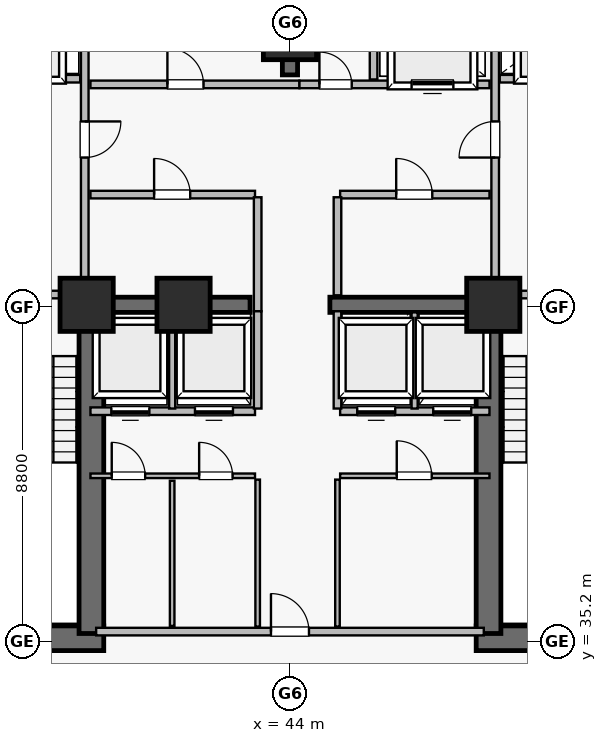
"""IFC4 building model, lengths in metres.
Left out: names, types, materials, properties, quantities, classifications, styles, units other than length and angle.
Written with IfcOpenShell. Run it as: python <this file> out.ifc"""

import sys

from ifc_helpers import new_model, si_unit, direction, frame, frame_2d, origin, origin_2d, place, context, subcontext, project, spatial, rectangle, extrude, element, fill, save


model = new_model("IFC4")
c1 = context("Model", 3, precision=1e-05, world=origin(), true_north=direction((0.0, 1.0)))
c2 = subcontext(c1, "Body", "Model", "MODEL_VIEW")
j1 = project(units=[si_unit("LENGTHUNIT", "METRE"), si_unit("PLANEANGLEUNIT", "RADIAN")], contexts=[c1])
p1 = place(None, origin())
s1 = spatial("IfcSite", under=j1, at=p1, CompositionType="ELEMENT")
p2 = place(p1, origin())
s2 = spatial("IfcBuilding", under=s1, at=p2, CompositionType="ELEMENT")
p3 = place(p2, frame((0.0, 0.0, -11.7)))
s3 = spatial("IfcBuildingStorey", under=s2, at=p3, CompositionType="ELEMENT", Elevation=-11.7)
for number, where, z_axis, x_axis in (
    (1, (34.95, 35.275, 0.0), (0.0, 0.0, 1.0), (1.0, 0.0, 0.0)),
    (2, (48.9, 35.275, 0.0), (0.0, 0.0, 1.0), (1.0, 0.0, 0.0)),
):
    element("IfcWall", number, at=place(p3, frame(where, z_axis=z_axis, x_axis=x_axis)), inside=s3, PredefinedType="SHEAR", context=c2, shape_type="SweptSolid", body=[
        extrude(rectangle(XDim=4.15, YDim=0.65, at=frame_2d((2.075, 0.0))), origin(), (0.0, 0.0, 1.0), 3.58),
    ])
for number, where, z_axis, x_axis in (
    (3, (38.775, 35.4, 0.0), (0.0, 0.0, 1.0), (0.0, 1.0, 0.0)),
    (4, (49.225, 35.4, 0.0), (0.0, 0.0, 1.0), (0.0, 1.0, 0.0)),
):
    element("IfcWall", number, at=place(p3, frame(where, z_axis=z_axis, x_axis=x_axis)), inside=s3, PredefinedType="SHEAR", context=c2, shape_type="SweptSolid", body=[
        extrude(rectangle(XDim=8.95, YDim=0.65, at=frame_2d((4.475, 0.0))), origin(), (0.0, 0.0, 1.0), 3.58),
    ])
p4 = place(p3, frame((44.0, 50.1, 0.0), z_axis=(0.0, 0.0, 1.0), x_axis=(0.0, 1.0, 0.0)))
e5 = element("IfcWall", 5, at=p4, inside=s3, PredefinedType="SHEAR", context=c2, shape_type="SweptSolid", body=[
    extrude(rectangle(XDim=2.1, YDim=0.4, at=frame_2d((1.05, 0.0))), origin(), (0.0, 0.0, 1.0), 3.58),
])
for number, where, z_axis, x_axis in (
    (6, (38.75, 44.05, 0.0), (0.0, 0.0, 1.0), (1.0, 0.0, 0.0)),
    (7, (45.05, 44.05, 0.0), (0.0, 0.0, 1.0), (1.0, 0.0, 0.0)),
):
    element("IfcWall", number, at=place(p3, frame(where, z_axis=z_axis, x_axis=x_axis)), inside=s3, PredefinedType="SHEAR", context=c2, shape_type="SweptSolid", body=[
        extrude(rectangle(XDim=4.2, YDim=0.4, at=frame_2d((2.1, 0.0))), origin(), (0.0, 0.0, 1.0), 3.58),
    ])
for number, where, z_axis, x_axis in (
    (8, (38.65, 44.05, 0.0), (0.0, 0.0, 1.0), (1.0, 0.0, 0.0)),
    (9, (49.35, 44.05, 0.0), (0.0, 0.0, 1.0), (1.0, 0.0, 0.0)),
    (10, (44.0, 51.2, 0.0), (0.0, 0.0, 1.0), (1.0, 0.0, 0.0)),
    (11, (41.2, 44.05, 0.0), (0.0, 0.0, 1.0), (1.0, 0.0, 0.0)),
):
    element("IfcColumn", number, at=place(p3, frame(where, z_axis=z_axis, x_axis=x_axis)), inside=s3, PredefinedType="COLUMN", context=c2, shape_type="SweptSolid", body=[
        extrude(rectangle(XDim=1.4, YDim=1.4, at=origin_2d()), origin(), (0.0, 0.0, 1.0), 3.9),
    ])
p5 = place(p3, frame((38.9, 35.45, 0.0), z_axis=(0.0, 0.0, 1.0), x_axis=(1.0, 0.0, 0.0)))
e12 = element("IfcWall", 12, at=p5, inside=s3, PredefinedType="SOLIDWALL", context=c2, shape_type="SweptSolid", body=[
    extrude(rectangle(XDim=10.2, YDim=0.2, at=frame_2d((5.1, 0.0))), origin(), (0.0, 0.0, 1.0), 3.58),
])
p6 = place(p5, frame((4.6, 0.0, 0.0)))
e13 = element("IfcOpeningElement", 13, at=p6, cuts=e12, PredefinedType="OPENING", context=c2, shape_type="SweptSolid", body=[
    extrude(rectangle(XDim=1.0, YDim=2.15, at=frame_2d((0.5, 1.075))), frame((0.0, 0.11, 0.0), z_axis=(0.0, -1.0, 0.0), x_axis=(1.0, 0.0, 0.0)), (0.0, 0.0, 1.0), 0.22),
])
p7 = place(p3, frame((38.6, 44.5, 0.0), z_axis=(0.0, 0.0, 1.0), x_axis=(0.0, 1.0, 0.0)))
e14 = element("IfcWall", 14, at=p7, inside=s3, PredefinedType="SOLIDWALL", context=c2, shape_type="SweptSolid", body=[
    extrude(rectangle(XDim=7.92, YDim=0.2, at=frame_2d((3.96, 0.0))), origin(), (0.0, 0.0, 1.0), 3.58),
])
p8 = place(p7, frame((3.425, 0.0, 0.0)))
e15 = element("IfcOpeningElement", 15, at=p8, cuts=e14, PredefinedType="OPENING", context=c2, shape_type="SweptSolid", body=[
    extrude(rectangle(XDim=0.95, YDim=2.15, at=frame_2d((0.475, 1.075))), frame((0.0, 0.11, 0.0), z_axis=(0.0, -1.0, 0.0), x_axis=(1.0, 0.0, 0.0)), (0.0, 0.0, 1.0), 0.22),
])
p9 = place(p3, frame((49.4, 44.5, 0.0), z_axis=(0.0, 0.0, 1.0), x_axis=(0.0, 1.0, 0.0)))
e16 = element("IfcWall", 16, at=p9, inside=s3, PredefinedType="SOLIDWALL", context=c2, shape_type="SweptSolid", body=[
    extrude(rectangle(XDim=7.92, YDim=0.2, at=frame_2d((3.96, 0.0))), origin(), (0.0, 0.0, 1.0), 3.58),
])
p10 = place(p9, frame((3.425, 0.0, 0.0)))
e17 = element("IfcOpeningElement", 17, at=p10, cuts=e16, PredefinedType="OPENING", context=c2, shape_type="SweptSolid", body=[
    extrude(rectangle(XDim=0.95, YDim=2.15, at=frame_2d((0.475, 1.075))), frame((0.0, 0.11, 0.0), z_axis=(0.0, -1.0, 0.0), x_axis=(1.0, 0.0, 0.0)), (0.0, 0.0, 1.0), 0.22),
])
p11 = place(p3, frame((38.75, 49.85, 0.0), z_axis=(0.0, 0.0, 1.0), x_axis=(1.0, 0.0, 0.0)))
e18 = element("IfcWall", 18, at=p11, inside=s3, PredefinedType="SOLIDWALL", context=c2, shape_type="SweptSolid", body=[
    extrude(rectangle(XDim=5.5, YDim=0.2, at=frame_2d((2.75, 0.0))), origin(), (0.0, 0.0, 1.0), 3.58),
])
p12 = place(p11, frame((2.025, 0.0, 0.0)))
e19 = element("IfcOpeningElement", 19, at=p12, cuts=e18, PredefinedType="OPENING", context=c2, shape_type="SweptSolid", body=[
    extrude(rectangle(XDim=0.95, YDim=2.15, at=frame_2d((0.475, 1.075))), frame((0.0, 0.11, 0.0), z_axis=(0.0, -1.0, 0.0), x_axis=(1.0, 0.0, 0.0)), (0.0, 0.0, 1.0), 0.22),
])
p13 = place(p3, frame((44.25, 49.85, 0.0), z_axis=(0.0, 0.0, 1.0), x_axis=(1.0, 0.0, 0.0)))
e20 = element("IfcWall", 20, at=p13, inside=s3, PredefinedType="SOLIDWALL", context=c2, shape_type="SweptSolid", body=[
    extrude(rectangle(XDim=5.0, YDim=0.2, at=frame_2d((2.5, 0.0))), origin(), (0.0, 0.0, 1.0), 2.918),
])
p14 = place(p13, frame((0.525, 0.0, 0.0)))
e21 = element("IfcOpeningElement", 21, at=p14, cuts=e20, PredefinedType="OPENING", context=c2, shape_type="SweptSolid", body=[
    extrude(rectangle(XDim=0.85, YDim=2.1, at=frame_2d((0.425, 1.05))), frame((0.0, 0.11, 0.0), z_axis=(0.0, -1.0, 0.0), x_axis=(1.0, 0.0, 0.0)), (0.0, 0.0, 1.0), 0.22),
])
p15 = place(p13, frame((2.95, 0.0, 0.0)))
e22 = element("IfcOpeningElement", 22, at=p15, cuts=e20, PredefinedType="OPENING", context=c2, shape_type="SweptSolid", body=[
    extrude(rectangle(XDim=1.1, YDim=2.15, at=frame_2d((0.55, 1.075))), frame((0.0, 0.11, 0.0), z_axis=(0.0, -1.0, 0.0), x_axis=(1.0, 0.0, 0.0)), (0.0, 0.0, 1.0), 0.22),
])
p16 = place(p3, frame((38.75, 46.95, 0.0), z_axis=(0.0, 0.0, 1.0), x_axis=(1.0, 0.0, 0.0)))
e23 = element("IfcWall", 23, at=p16, inside=s3, PredefinedType="SOLIDWALL", context=c2, shape_type="SweptSolid", body=[
    extrude(rectangle(XDim=4.33, YDim=0.2, at=frame_2d((2.165, 0.0))), origin(), (0.0, 0.0, 1.0), 3.58),
])
p17 = place(p16, frame((1.675, 0.0, 0.0)))
e24 = element("IfcOpeningElement", 24, at=p17, cuts=e23, PredefinedType="OPENING", context=c2, shape_type="SweptSolid", body=[
    extrude(rectangle(XDim=0.95, YDim=2.15, at=frame_2d((0.475, 1.075))), frame((0.0, 0.11, 0.0), z_axis=(0.0, -1.0, 0.0), x_axis=(1.0, 0.0, 0.0)), (0.0, 0.0, 1.0), 0.22),
])
p18 = place(p3, frame((38.75, 41.25, 0.0), z_axis=(0.0, 0.0, 1.0), x_axis=(1.0, 0.0, 0.0)))
e25 = element("IfcWall", 25, at=p18, inside=s3, PredefinedType="SOLIDWALL", context=c2, shape_type="SweptSolid", body=[
    extrude(rectangle(XDim=4.33, YDim=0.2, at=frame_2d((2.165, 0.0))), origin(), (0.0, 0.0, 1.0), 3.58),
])
p19 = place(p18, frame((0.55, 0.0, 0.0)))
e26 = element("IfcOpeningElement", 26, at=p19, cuts=e25, PredefinedType="OPENING", context=c2, shape_type="SweptSolid", body=[
    extrude(rectangle(XDim=1.0, YDim=2.15, at=frame_2d((0.5, 1.075))), frame((0.0, 0.11, 0.0), z_axis=(0.0, -1.0, 0.0), x_axis=(1.0, 0.0, 0.0)), (0.0, 0.0, 1.0), 0.22),
])
p20 = place(p18, frame((2.75, 0.0, 0.0)))
e27 = element("IfcOpeningElement", 27, at=p20, cuts=e25, PredefinedType="OPENING", context=c2, shape_type="SweptSolid", body=[
    extrude(rectangle(XDim=1.0, YDim=2.15, at=frame_2d((0.5, 1.075))), frame((0.0, 0.11, 0.0), z_axis=(0.0, -1.0, 0.0), x_axis=(1.0, 0.0, 0.0)), (0.0, 0.0, 1.0), 0.22),
])
p21 = place(p3, frame((38.75, 39.55, 0.0), z_axis=(0.0, 0.0, 1.0), x_axis=(1.0, 0.0, 0.0)))
e28 = element("IfcWall", 28, at=p21, inside=s3, PredefinedType="PARTITIONING", context=c2, shape_type="SweptSolid", body=[
    extrude(rectangle(XDim=4.33, YDim=0.12, at=frame_2d((2.165, 0.0))), origin(), (0.0, 0.0, 1.0), 3.58),
])
p22 = place(p21, frame((0.56, 0.0, 0.0)))
e29 = element("IfcOpeningElement", 29, at=p22, cuts=e28, PredefinedType="OPENING", context=c2, shape_type="SweptSolid", body=[
    extrude(rectangle(XDim=0.88, YDim=2.1, at=frame_2d((0.44, 1.05))), frame((0.0, 0.07, 0.0), z_axis=(0.0, -1.0, 0.0), x_axis=(1.0, 0.0, 0.0)), (0.0, 0.0, 1.0), 0.14),
])
p23 = place(p21, frame((2.86, 0.0, 0.0)))
e30 = element("IfcOpeningElement", 30, at=p23, cuts=e28, PredefinedType="OPENING", context=c2, shape_type="SweptSolid", body=[
    extrude(rectangle(XDim=0.88, YDim=2.1, at=frame_2d((0.44, 1.05))), frame((0.0, 0.07, 0.0), z_axis=(0.0, -1.0, 0.0), x_axis=(1.0, 0.0, 0.0)), (0.0, 0.0, 1.0), 0.14),
])
p24 = place(p3, frame((45.32, 46.95, 0.0), z_axis=(0.0, 0.0, 1.0), x_axis=(1.0, 0.0, 0.0)))
e31 = element("IfcWall", 31, at=p24, inside=s3, PredefinedType="SOLIDWALL", context=c2, shape_type="SweptSolid", body=[
    extrude(rectangle(XDim=3.93, YDim=0.2, at=frame_2d((1.965, 0.0))), origin(), (0.0, 0.0, 1.0), 2.918),
])
p25 = place(p24, frame((1.475, 0.0, 0.0)))
e32 = element("IfcOpeningElement", 32, at=p25, cuts=e31, PredefinedType="OPENING", context=c2, shape_type="SweptSolid", body=[
    extrude(rectangle(XDim=0.95, YDim=2.15, at=frame_2d((0.475, 1.075))), frame((0.0, 0.11, 0.0), z_axis=(0.0, -1.0, 0.0), x_axis=(1.0, 0.0, 0.0)), (0.0, 0.0, 1.0), 0.22),
])
p26 = place(p3, frame((45.32, 41.25, 0.0), z_axis=(0.0, 0.0, 1.0), x_axis=(1.0, 0.0, 0.0)))
e33 = element("IfcWall", 33, at=p26, inside=s3, PredefinedType="SOLIDWALL", context=c2, shape_type="SweptSolid", body=[
    extrude(rectangle(XDim=3.93, YDim=0.2, at=frame_2d((1.965, 0.0))), origin(), (0.0, 0.0, 1.0), 3.58),
])
p27 = place(p26, frame((0.45, 0.0, 0.0)))
e34 = element("IfcOpeningElement", 34, at=p27, cuts=e33, PredefinedType="OPENING", context=c2, shape_type="SweptSolid", body=[
    extrude(rectangle(XDim=1.0, YDim=2.15, at=frame_2d((0.5, 1.075))), frame((0.0, 0.11, 0.0), z_axis=(0.0, -1.0, 0.0), x_axis=(1.0, 0.0, 0.0)), (0.0, 0.0, 1.0), 0.22),
])
p28 = place(p26, frame((2.45, 0.0, 0.0)))
e35 = element("IfcOpeningElement", 35, at=p28, cuts=e33, PredefinedType="OPENING", context=c2, shape_type="SweptSolid", body=[
    extrude(rectangle(XDim=1.0, YDim=2.15, at=frame_2d((0.5, 1.075))), frame((0.0, 0.11, 0.0), z_axis=(0.0, -1.0, 0.0), x_axis=(1.0, 0.0, 0.0)), (0.0, 0.0, 1.0), 0.22),
])
p29 = place(p3, frame((45.32, 39.55, 0.0), z_axis=(0.0, 0.0, 1.0), x_axis=(1.0, 0.0, 0.0)))
e36 = element("IfcWall", 36, at=p29, inside=s3, PredefinedType="PARTITIONING", context=c2, shape_type="SweptSolid", body=[
    extrude(rectangle(XDim=3.93, YDim=0.12, at=frame_2d((1.965, 0.0))), origin(), (0.0, 0.0, 1.0), 3.58),
])
p30 = place(p29, frame((1.49, 0.0, 0.0)))
e37 = element("IfcOpeningElement", 37, at=p30, cuts=e36, PredefinedType="OPENING", context=c2, shape_type="SweptSolid", body=[
    extrude(rectangle(XDim=0.92, YDim=2.1, at=frame_2d((0.46, 1.05))), frame((0.0, 0.07, 0.0), z_axis=(0.0, -1.0, 0.0), x_axis=(1.0, 0.0, 0.0)), (0.0, 0.0, 1.0), 0.14),
])
p31 = place(p3, frame((35.65, 44.32, 0.0), z_axis=(0.0, 0.0, 1.0), x_axis=(1.0, 0.0, 0.0)))
e38 = element("IfcWall", 38, at=p31, inside=s3, PredefinedType="SOLIDWALL", context=c2, shape_type="SweptSolid", body=[
    extrude(rectangle(XDim=2.8, YDim=0.2, at=frame_2d((1.4, 0.0))), origin(), (0.0, 0.0, 1.0), 3.58),
])
p32 = place(p31, frame((0.9, 0.0, 0.0)))
e39 = element("IfcOpeningElement", 39, at=p32, cuts=e38, PredefinedType="OPENING", context=c2, shape_type="SweptSolid", body=[
    extrude(rectangle(XDim=1.0, YDim=2.15, at=frame_2d((0.5, 1.075))), frame((0.0, 0.11, 0.0), z_axis=(0.0, -1.0, 0.0), x_axis=(1.0, 0.0, 0.0)), (0.0, 0.0, 1.0), 0.22),
])
p33 = place(p3, frame((49.55, 44.32, 0.0), z_axis=(0.0, 0.0, 1.0), x_axis=(1.0, 0.0, 0.0)))
e40 = element("IfcWall", 40, at=p33, inside=s3, PredefinedType="SOLIDWALL", context=c2, shape_type="SweptSolid", body=[
    extrude(rectangle(XDim=2.8, YDim=0.2, at=frame_2d((1.4, 0.0))), origin(), (0.0, 0.0, 1.0), 3.58),
])
p34 = place(p33, frame((0.9, 0.0, 0.0)))
e41 = element("IfcOpeningElement", 41, at=p34, cuts=e40, PredefinedType="OPENING", context=c2, shape_type="SweptSolid", body=[
    extrude(rectangle(XDim=1.0, YDim=2.15, at=frame_2d((0.5, 1.075))), frame((0.0, 0.11, 0.0), z_axis=(0.0, -1.0, 0.0), x_axis=(1.0, 0.0, 0.0)), (0.0, 0.0, 1.0), 0.22),
])
p35 = place(p3, frame((35.68, 50.0, 0.0), z_axis=(0.0, 0.0, 1.0), x_axis=(1.0, 0.0, 0.0)))
e42 = element("IfcWall", 42, at=p35, inside=s3, PredefinedType="SOLIDWALL", context=c2, shape_type="SweptSolid", body=[
    extrude(rectangle(XDim=2.8, YDim=0.2, at=frame_2d((1.4, 0.0))), origin(), (0.0, 0.0, 1.0), 3.58),
])
p36 = place(p35, frame((0.85, 0.0, 0.0)))
e43 = element("IfcOpeningElement", 43, at=p36, cuts=e42, PredefinedType="OPENING", context=c2, shape_type="SweptSolid", body=[
    extrude(rectangle(XDim=1.1, YDim=2.15, at=frame_2d((0.55, 1.075))), frame((0.0, 0.11, 0.0), z_axis=(0.0, -1.0, 0.0), x_axis=(1.0, 0.0, 0.0)), (0.0, 0.0, 1.0), 0.22),
])
p37 = place(p3, frame((49.52, 50.0, 0.0), z_axis=(0.0, 0.0, 1.0), x_axis=(1.0, 0.0, 0.0)))
e44 = element("IfcWall", 44, at=p37, inside=s3, PredefinedType="SOLIDWALL", context=c2, shape_type="SweptSolid", body=[
    extrude(rectangle(XDim=2.8, YDim=0.2, at=frame_2d((1.4, 0.0))), origin(), (0.0, 0.0, 1.0), 3.58),
])
p38 = place(p37, frame((0.85, 0.0, 0.0)))
e45 = element("IfcOpeningElement", 45, at=p38, cuts=e44, PredefinedType="OPENING", context=c2, shape_type="SweptSolid", body=[
    extrude(rectangle(XDim=1.1, YDim=2.15, at=frame_2d((0.55, 1.075))), frame((0.0, 0.11, 0.0), z_axis=(0.0, -1.0, 0.0), x_axis=(1.0, 0.0, 0.0)), (0.0, 0.0, 1.0), 0.22),
])
for number, where, z_axis, x_axis in (
    (46, (43.15, 35.58, 0.0), (0.0, 0.0, 1.0), (0.0, 1.0, 0.0)),
    (47, (45.25, 35.58, 0.0), (0.0, 0.0, 1.0), (0.0, 1.0, 0.0)),
):
    element("IfcWall", number, at=place(p3, frame(where, z_axis=z_axis, x_axis=x_axis)), inside=s3, PredefinedType="PARTITIONING", context=c2, shape_type="SweptSolid", body=[
        extrude(rectangle(XDim=3.87, YDim=0.12, at=frame_2d((1.935, 0.0))), origin(), (0.0, 0.0, 1.0), 3.58),
    ])
p39 = place(p3, frame((40.9, 35.6, 0.0), z_axis=(0.0, 0.0, 1.0), x_axis=(0.0, 1.0, 0.0)))
e48 = element("IfcWall", 48, at=p39, inside=s3, PredefinedType="PARTITIONING", context=c2, shape_type="SweptSolid", body=[
    extrude(rectangle(XDim=3.82, YDim=0.12, at=frame_2d((1.91, 0.0))), origin(), (0.0, 0.0, 1.0), 3.58),
])
p40 = place(p3, frame((43.15, 43.88, 0.0), z_axis=(0.0, 0.0, 1.0), x_axis=(0.0, 1.0, 0.0)))
e49 = element("IfcWall", 49, at=p40, inside=s3, PredefinedType="SOLIDWALL", context=c2, shape_type="SweptSolid", body=[
    extrude(rectangle(XDim=3.0, YDim=0.2, at=frame_2d((1.5, 0.0))), origin(), (0.0, 0.0, 1.0), 3.58),
])
p41 = place(p3, frame((45.25, 44.3, 0.0), z_axis=(0.0, 0.0, 1.0), x_axis=(0.0, 1.0, 0.0)))
e50 = element("IfcWall", 50, at=p41, inside=s3, PredefinedType="SOLIDWALL", context=c2, shape_type="SweptSolid", body=[
    extrude(rectangle(XDim=2.58, YDim=0.2, at=frame_2d((1.29, 0.0))), origin(), (0.0, 0.0, 1.0), 3.58),
])
for number, where, z_axis, x_axis in (
    (51, (43.15, 41.32, 0.0), (0.0, 0.0, 1.0), (0.0, 1.0, 0.0)),
    (52, (45.25, 41.32, 0.0), (0.0, 0.0, 1.0), (0.0, 1.0, 0.0)),
):
    element("IfcWall", number, at=place(p3, frame(where, z_axis=z_axis, x_axis=x_axis)), inside=s3, PredefinedType="SOLIDWALL", context=c2, shape_type="SweptSolid", body=[
        extrude(rectangle(XDim=2.56, YDim=0.2, at=frame_2d((1.28, 0.0))), origin(), (0.0, 0.0, 1.0), 3.58),
    ])
for number, where, z_axis, x_axis in (
    (53, (40.9, 41.32, 0.0), (0.0, 0.0, 1.0), (0.0, 1.0, 0.0)),
    (54, (47.28, 41.32, 0.0), (0.0, 0.0, 1.0), (0.0, 1.0, 0.0)),
):
    element("IfcWall", number, at=place(p3, frame(where, z_axis=z_axis, x_axis=x_axis)), inside=s3, PredefinedType="SOLIDWALL", context=c2, shape_type="SweptSolid", body=[
        extrude(rectangle(XDim=2.53, YDim=0.16, at=frame_2d((1.265, 0.0))), origin(), (0.0, 0.0, 1.0), 3.58),
    ])
p42 = place(p3, frame((46.2, 49.98, 0.0), z_axis=(0.0, 0.0, 1.0), x_axis=(0.0, 1.0, 0.0)))
e55 = element("IfcWall", 55, at=p42, inside=s3, PredefinedType="SOLIDWALL", context=c2, shape_type="SweptSolid", body=[
    extrude(rectangle(XDim=2.37, YDim=0.2, at=frame_2d((1.185, 0.0))), origin(), (0.0, 0.0, 1.0), 3.58),
])
p43 = place(p8, frame((0.95, 0.0, 0.0), z_axis=(0.0, 0.0, 1.0), x_axis=(-1.0, 0.0, 0.0)))
e56 = element("IfcDoor", 56, at=p43, inside=s3, OperationType="SINGLE_SWING_RIGHT", PredefinedType="DOOR", context=c2, shape_type="SweptSolid", body=[
    extrude(rectangle(XDim=0.95, YDim=2.15, at=frame_2d((0.475, 1.075))), frame((0.0, 0.025, 0.0), z_axis=(0.0, -1.0, 0.0), x_axis=(1.0, 0.0, 0.0)), (0.0, 0.0, 1.0), 0.05),
])
fill(e15, e56)
p44 = place(p10, origin())
e57 = element("IfcDoor", 57, at=p44, inside=s3, OperationType="SINGLE_SWING_LEFT", PredefinedType="DOOR", context=c2, shape_type="SweptSolid", body=[
    extrude(rectangle(XDim=0.95, YDim=2.15, at=frame_2d((0.475, 1.075))), frame((0.0, 0.025, 0.0), z_axis=(0.0, -1.0, 0.0), x_axis=(1.0, 0.0, 0.0)), (0.0, 0.0, 1.0), 0.05),
])
fill(e17, e57)
p45 = place(p6, origin())
e58 = element("IfcDoor", 58, at=p45, inside=s3, OperationType="SINGLE_SWING_LEFT", PredefinedType="DOOR", context=c2, shape_type="SweptSolid", body=[
    extrude(rectangle(XDim=1.0, YDim=2.15, at=frame_2d((0.5, 1.075))), frame((0.0, 0.025, 0.0), z_axis=(0.0, -1.0, 0.0), x_axis=(1.0, 0.0, 0.0)), (0.0, 0.0, 1.0), 0.05),
])
fill(e13, e58)
p46 = place(p12, origin())
e59 = element("IfcDoor", 59, at=p46, inside=s3, OperationType="SINGLE_SWING_LEFT", PredefinedType="DOOR", context=c2, shape_type="SweptSolid", body=[
    extrude(rectangle(XDim=0.95, YDim=2.15, at=frame_2d((0.475, 1.075))), frame((0.0, 0.025, 0.0), z_axis=(0.0, -1.0, 0.0), x_axis=(1.0, 0.0, 0.0)), (0.0, 0.0, 1.0), 0.05),
])
fill(e19, e59)
p47 = place(p14, origin())
e60 = element("IfcDoor", 60, at=p47, inside=s3, OperationType="SINGLE_SWING_LEFT", PredefinedType="DOOR", context=c2, shape_type="SweptSolid", body=[
    extrude(rectangle(XDim=0.85, YDim=2.1, at=frame_2d((0.425, 1.05))), frame((0.0, 0.025, 0.0), z_axis=(0.0, -1.0, 0.0), x_axis=(1.0, 0.0, 0.0)), (0.0, 0.0, 1.0), 0.05),
])
fill(e21, e60)
p48 = place(p15, origin())
e61 = element("IfcDoor", 61, at=p48, inside=s3, OperationType="SLIDING_TO_LEFT", PredefinedType="DOOR", context=c2, shape_type="SweptSolid", body=[
    extrude(rectangle(XDim=1.1, YDim=2.15, at=frame_2d((0.55, 1.075))), frame((0.0, 0.025, 0.0), z_axis=(0.0, -1.0, 0.0), x_axis=(1.0, 0.0, 0.0)), (0.0, 0.0, 1.0), 0.05),
])
fill(e22, e61)
p49 = place(p17, origin())
e62 = element("IfcDoor", 62, at=p49, inside=s3, OperationType="SINGLE_SWING_LEFT", PredefinedType="DOOR", context=c2, shape_type="SweptSolid", body=[
    extrude(rectangle(XDim=0.95, YDim=2.15, at=frame_2d((0.475, 1.075))), frame((0.0, 0.025, 0.0), z_axis=(0.0, -1.0, 0.0), x_axis=(1.0, 0.0, 0.0)), (0.0, 0.0, 1.0), 0.05),
])
fill(e24, e62)
p50 = place(p25, origin())
e63 = element("IfcDoor", 63, at=p50, inside=s3, OperationType="SINGLE_SWING_LEFT", PredefinedType="DOOR", context=c2, shape_type="SweptSolid", body=[
    extrude(rectangle(XDim=0.95, YDim=2.15, at=frame_2d((0.475, 1.075))), frame((0.0, 0.025, 0.0), z_axis=(0.0, -1.0, 0.0), x_axis=(1.0, 0.0, 0.0)), (0.0, 0.0, 1.0), 0.05),
])
fill(e32, e63)
p51 = place(p19, frame((1.0, 0.0, 0.0), z_axis=(0.0, 0.0, 1.0), x_axis=(-1.0, 0.0, 0.0)))
e64 = element("IfcDoor", 64, at=p51, inside=s3, OperationType="SLIDING_TO_LEFT", PredefinedType="DOOR", context=c2, shape_type="SweptSolid", body=[
    extrude(rectangle(XDim=1.0, YDim=2.15, at=frame_2d((0.5, 1.075))), frame((0.0, 0.025, 0.0), z_axis=(0.0, -1.0, 0.0), x_axis=(1.0, 0.0, 0.0)), (0.0, 0.0, 1.0), 0.05),
])
fill(e26, e64)
p52 = place(p20, frame((1.0, 0.0, 0.0), z_axis=(0.0, 0.0, 1.0), x_axis=(-1.0, 0.0, 0.0)))
e65 = element("IfcDoor", 65, at=p52, inside=s3, OperationType="SLIDING_TO_LEFT", PredefinedType="DOOR", context=c2, shape_type="SweptSolid", body=[
    extrude(rectangle(XDim=1.0, YDim=2.15, at=frame_2d((0.5, 1.075))), frame((0.0, 0.025, 0.0), z_axis=(0.0, -1.0, 0.0), x_axis=(1.0, 0.0, 0.0)), (0.0, 0.0, 1.0), 0.05),
])
fill(e27, e65)
p53 = place(p27, frame((1.0, 0.0, 0.0), z_axis=(0.0, 0.0, 1.0), x_axis=(-1.0, 0.0, 0.0)))
e66 = element("IfcDoor", 66, at=p53, inside=s3, OperationType="SLIDING_TO_LEFT", PredefinedType="DOOR", context=c2, shape_type="SweptSolid", body=[
    extrude(rectangle(XDim=1.0, YDim=2.15, at=frame_2d((0.5, 1.075))), frame((0.0, 0.025, 0.0), z_axis=(0.0, -1.0, 0.0), x_axis=(1.0, 0.0, 0.0)), (0.0, 0.0, 1.0), 0.05),
])
fill(e34, e66)
p54 = place(p28, frame((1.0, 0.0, 0.0), z_axis=(0.0, 0.0, 1.0), x_axis=(-1.0, 0.0, 0.0)))
e67 = element("IfcDoor", 67, at=p54, inside=s3, OperationType="SLIDING_TO_LEFT", PredefinedType="DOOR", context=c2, shape_type="SweptSolid", body=[
    extrude(rectangle(XDim=1.0, YDim=2.15, at=frame_2d((0.5, 1.075))), frame((0.0, 0.025, 0.0), z_axis=(0.0, -1.0, 0.0), x_axis=(1.0, 0.0, 0.0)), (0.0, 0.0, 1.0), 0.05),
])
fill(e35, e67)
p55 = place(p22, origin())
e68 = element("IfcDoor", 68, at=p55, inside=s3, OperationType="SINGLE_SWING_LEFT", PredefinedType="DOOR", context=c2, shape_type="SweptSolid", body=[
    extrude(rectangle(XDim=0.88, YDim=2.1, at=frame_2d((0.44, 1.05))), frame((0.0, 0.025, 0.0), z_axis=(0.0, -1.0, 0.0), x_axis=(1.0, 0.0, 0.0)), (0.0, 0.0, 1.0), 0.05),
])
fill(e29, e68)
p56 = place(p23, origin())
e69 = element("IfcDoor", 69, at=p56, inside=s3, OperationType="SINGLE_SWING_LEFT", PredefinedType="DOOR", context=c2, shape_type="SweptSolid", body=[
    extrude(rectangle(XDim=0.88, YDim=2.1, at=frame_2d((0.44, 1.05))), frame((0.0, 0.025, 0.0), z_axis=(0.0, -1.0, 0.0), x_axis=(1.0, 0.0, 0.0)), (0.0, 0.0, 1.0), 0.05),
])
fill(e30, e69)
p57 = place(p30, origin())
e70 = element("IfcDoor", 70, at=p57, inside=s3, OperationType="SINGLE_SWING_LEFT", PredefinedType="DOOR", context=c2, shape_type="SweptSolid", body=[
    extrude(rectangle(XDim=0.92, YDim=2.1, at=frame_2d((0.46, 1.05))), frame((0.0, 0.025, 0.0), z_axis=(0.0, -1.0, 0.0), x_axis=(1.0, 0.0, 0.0)), (0.0, 0.0, 1.0), 0.05),
])
fill(e37, e70)
save(model, sys.argv[1])
